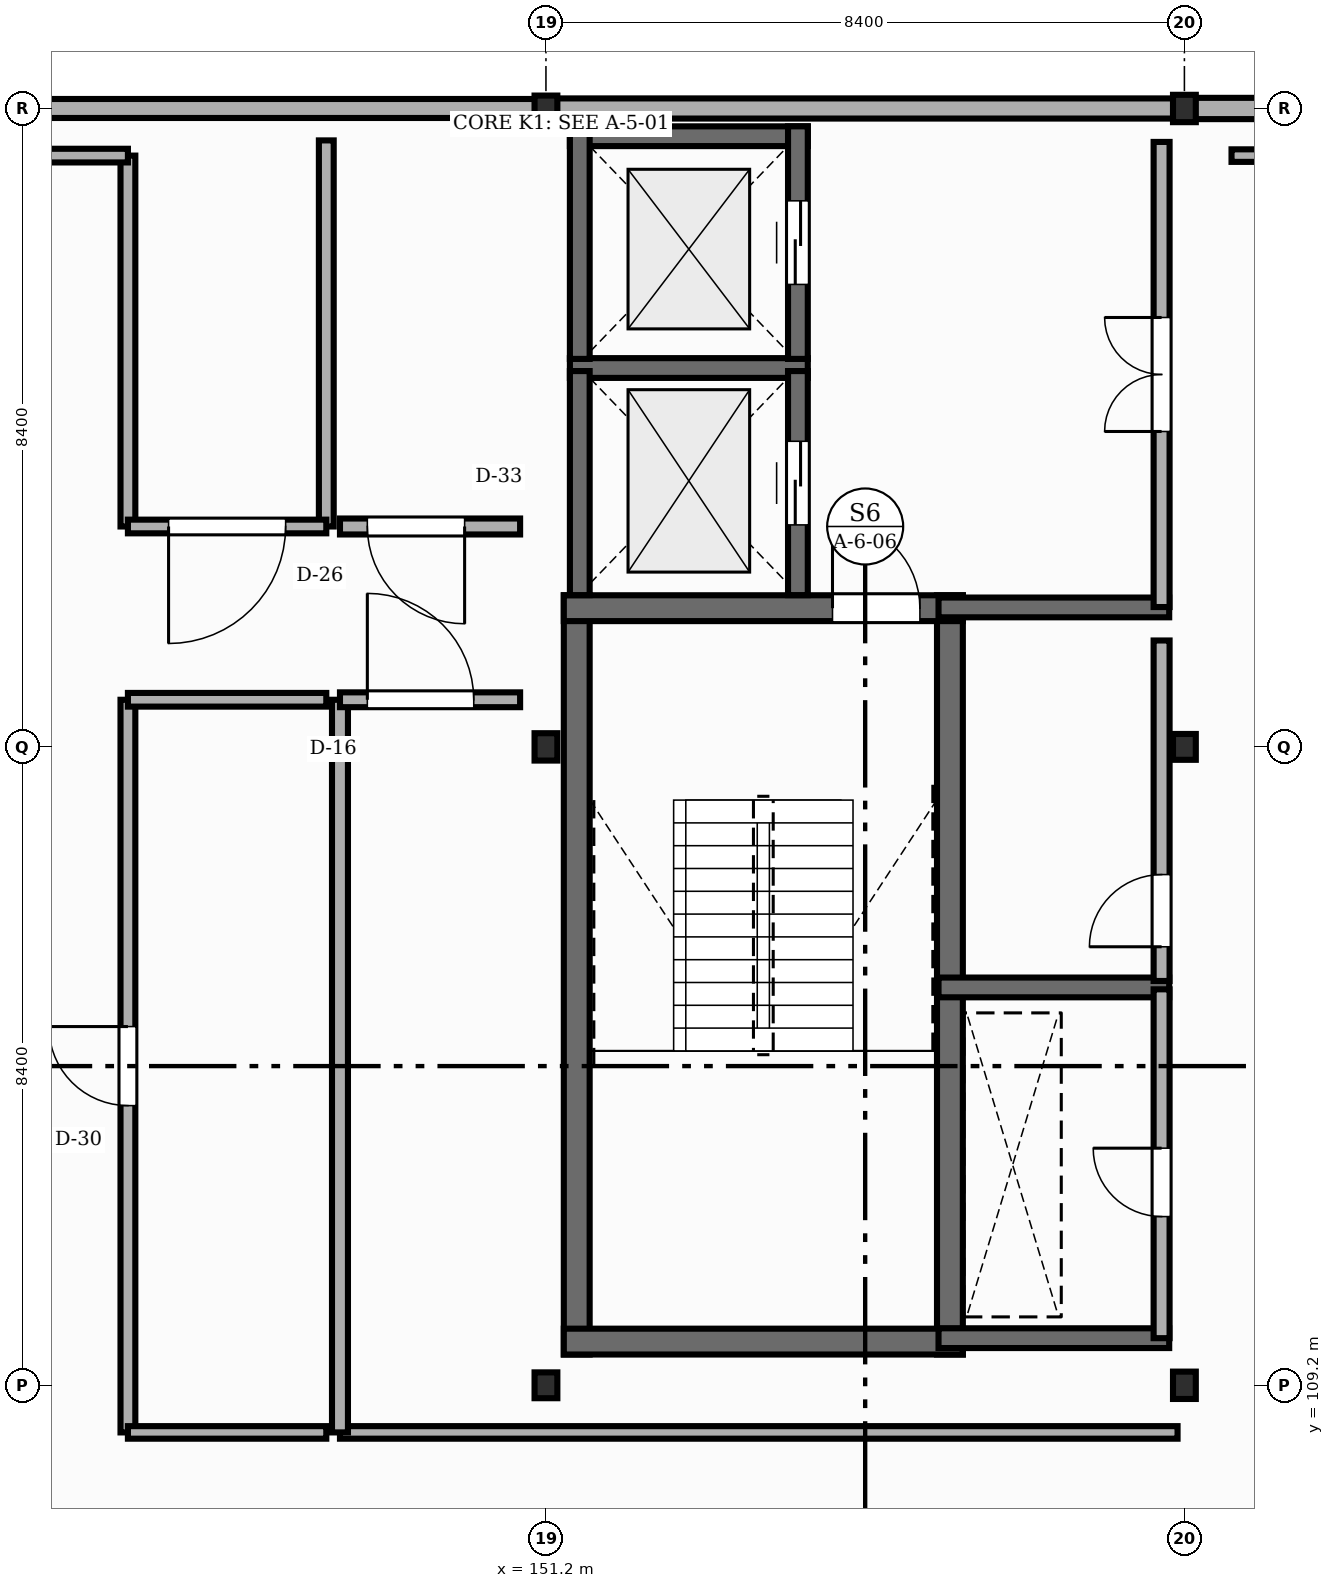
"""IFC4 building model, lengths in metres.
Left out: names, types, materials, properties, quantities, classifications, styles, units other than length and angle.
Written with IfcOpenShell. Run it as: python <this file> out.ifc"""

import sys

from ifc_helpers import new_model, si_unit, direction, frame, frame_2d, origin, origin_2d, place, context, subcontext, project, spatial, rectangle, i_section, extrude, element, fill, save


model = new_model("IFC4")
c1 = context("Model", 3, precision=1e-05, world=origin(), true_north=direction((0.0, 1.0)))
c2 = subcontext(c1, "Body", "Model", "MODEL_VIEW")
j1 = project(units=[si_unit("LENGTHUNIT", "METRE"), si_unit("PLANEANGLEUNIT", "RADIAN")], contexts=[c1])
p1 = place(None, origin())
s1 = spatial("IfcSite", under=j1, at=p1, CompositionType="ELEMENT")
p2 = place(p1, origin())
s2 = spatial("IfcBuilding", under=s1, at=p2, CompositionType="ELEMENT")
p3 = place(p2, frame((0.0, 0.0, 26.1)))
s3 = spatial("IfcBuildingStorey", under=s2, at=p3, CompositionType="ELEMENT", Elevation=26.1)
p4 = place(p3, frame((151.2, 109.2, 0.0), z_axis=(0.0, 0.0, 1.0), x_axis=(1.0, 0.0, 0.0)))
e1 = element("IfcColumn", 1, at=p4, inside=s3, PredefinedType="COLUMN", context=c2, shape_type="SweptSolid", body=[
    extrude(i_section(OverallWidth=0.3, OverallDepth=0.34, WebThickness=0.012, FlangeThickness=0.021, FilletRadius=0.027, at=origin_2d()), origin(), (0.0, 0.0, 1.0), 4.05),
])
p5 = place(p3, frame((151.2, 117.6, 0.0), z_axis=(0.0, 0.0, 1.0), x_axis=(1.0, 0.0, 0.0)))
e2 = element("IfcColumn", 2, at=p5, inside=s3, PredefinedType="COLUMN", context=c2, shape_type="SweptSolid", body=[
    extrude(i_section(OverallWidth=0.3, OverallDepth=0.36, WebThickness=0.012, FlangeThickness=0.022, FilletRadius=0.027, at=origin_2d()), origin(), (0.0, 0.0, 1.0), 4.05),
])
p6 = place(p3, frame((151.2, 126.0, 0.0), z_axis=(0.0, 0.0, 1.0), x_axis=(1.0, 0.0, 0.0)))
e3 = element("IfcColumn", 3, at=p6, inside=s3, PredefinedType="COLUMN", context=c2, shape_type="SweptSolid", body=[
    extrude(i_section(OverallWidth=0.3, OverallDepth=0.34, WebThickness=0.012, FlangeThickness=0.021, FilletRadius=0.027, at=origin_2d()), origin(), (0.0, 0.0, 1.0), 4.05),
])
p7 = place(p3, frame((159.6, 109.2, 0.0), z_axis=(0.0, 0.0, 1.0), x_axis=(1.0, 0.0, 0.0)))
e4 = element("IfcColumn", 4, at=p7, inside=s3, PredefinedType="COLUMN", context=c2, shape_type="SweptSolid", body=[
    extrude(i_section(OverallWidth=0.3, OverallDepth=0.36, WebThickness=0.012, FlangeThickness=0.022, FilletRadius=0.027, at=origin_2d()), origin(), (0.0, 0.0, 1.0), 4.05),
])
p8 = place(p3, frame((159.6, 117.6, 0.0), z_axis=(0.0, 0.0, 1.0), x_axis=(1.0, 0.0, 0.0)))
e5 = element("IfcColumn", 5, at=p8, inside=s3, PredefinedType="COLUMN", context=c2, shape_type="SweptSolid", body=[
    extrude(i_section(OverallWidth=0.3, OverallDepth=0.34, WebThickness=0.012, FlangeThickness=0.021, FilletRadius=0.027, at=origin_2d()), origin(), (0.0, 0.0, 1.0), 4.05),
])
p9 = place(p3, frame((159.6, 126.0, 0.0), z_axis=(0.0, 0.0, 1.0), x_axis=(1.0, 0.0, 0.0)))
e6 = element("IfcColumn", 6, at=p9, inside=s3, PredefinedType="COLUMN", context=c2, shape_type="SweptSolid", body=[
    extrude(i_section(OverallWidth=0.3, OverallDepth=0.36, WebThickness=0.012, FlangeThickness=0.022, FilletRadius=0.027, at=origin_2d()), origin(), (0.0, 0.0, 1.0), 4.05),
])
p10 = place(p3, frame((167.992, 126.0, 0.0), z_axis=(0.0, 0.0, 1.0), x_axis=(-1.0, 0.0, 0.0)))
e7 = element("IfcWall", 7, at=p10, inside=s3, PredefinedType="STANDARD", context=c2, shape_type="SweptSolid", body=[
    extrude(rectangle(XDim=8.384, YDim=0.28, at=frame_2d((4.192, 0.0))), origin(), (0.0, 0.0, 1.0), 3.497),
])
p11 = place(p3, frame((159.592, 126.0, 0.0), z_axis=(0.0, 0.0, 1.0), x_axis=(-1.0, 0.0, 0.0)))
e8 = element("IfcWall", 8, at=p11, inside=s3, PredefinedType="STANDARD", context=c2, shape_type="SweptSolid", body=[
    extrude(rectangle(XDim=8.384, YDim=0.265, at=frame_2d((4.192, 0.0))), origin(), (0.0, 0.0, 1.0), 3.527),
])
p12 = place(p3, frame((151.192, 126.0, 0.0), z_axis=(0.0, 0.0, 1.0), x_axis=(-1.0, 0.0, 0.0)))
e9 = element("IfcWall", 9, at=p12, inside=s3, PredefinedType="STANDARD", context=c2, shape_type="SweptSolid", body=[
    extrude(rectangle(XDim=8.384, YDim=0.25, at=frame_2d((4.192, 0.0))), origin(), (0.0, 0.0, 1.0), 3.497),
])
for number, where, z_axis, x_axis in (
    (10, (151.605, 109.605, 0.0), (0.0, 0.0, 1.0), (0.0, 1.0, 0.0)),
    (11, (156.515, 109.605, 0.0), (0.0, 0.0, 1.0), (0.0, 1.0, 0.0)),
):
    element("IfcWall", number, at=place(p3, frame(where, z_axis=z_axis, x_axis=x_axis)), inside=s3, PredefinedType="SHEAR", context=c2, shape_type="SweptSolid", body=[
        extrude(rectangle(XDim=9.99, YDim=0.34, at=frame_2d((4.995, 0.0))), origin(), (0.0, 0.0, 1.0), 3.85),
    ])
p13 = place(p3, frame((151.435, 109.775, 0.0), z_axis=(0.0, 0.0, 1.0), x_axis=(1.0, 0.0, 0.0)))
e12 = element("IfcWall", 12, at=p13, inside=s3, PredefinedType="SHEAR", context=c2, shape_type="SweptSolid", body=[
    extrude(rectangle(XDim=5.25, YDim=0.34, at=frame_2d((2.625, 0.0))), origin(), (0.0, 0.0, 1.0), 3.85),
])
p14 = place(p3, frame((151.435, 119.425, 0.0), z_axis=(0.0, 0.0, 1.0), x_axis=(1.0, 0.0, 0.0)))
e13 = element("IfcWall", 13, at=p14, inside=s3, PredefinedType="SHEAR", context=c2, shape_type="SweptSolid", body=[
    extrude(rectangle(XDim=5.25, YDim=0.34, at=frame_2d((2.625, 0.0))), origin(), (0.0, 0.0, 1.0), 3.85),
])
p15 = place(p14, frame((3.535, 0.0, 0.0)))
e14 = element("IfcOpeningElement", 14, at=p15, cuts=e13, PredefinedType="OPENING", context=c2, shape_type="SweptSolid", body=[
    extrude(rectangle(XDim=1.15, YDim=2.15, at=frame_2d((0.575, 1.075))), frame((0.0, 0.18, 0.0), z_axis=(0.0, -1.0, 0.0), x_axis=(1.0, 0.0, 0.0)), (0.0, 0.0, 1.0), 0.36),
])
p16 = place(p3, frame((151.515, 122.585, 0.0), z_axis=(0.0, 0.0, 1.0), x_axis=(1.0, 0.0, 0.0)))
e15 = element("IfcWall", 15, at=p16, inside=s3, PredefinedType="SHEAR", context=c2, shape_type="SweptSolid", body=[
    extrude(rectangle(XDim=3.13, YDim=0.26, at=frame_2d((1.565, 0.0))), origin(), (0.0, 0.0, 1.0), 3.85),
])
p17 = place(p3, frame((151.645, 119.597, 0.0), z_axis=(0.0, 0.0, 1.0), x_axis=(0.0, 1.0, 0.0)))
e16 = element("IfcWall", 16, at=p17, inside=s3, PredefinedType="SHEAR", context=c2, shape_type="SweptSolid", body=[
    extrude(rectangle(XDim=2.948, YDim=0.26, at=frame_2d((1.474, 0.0))), origin(), (0.0, 0.0, 1.0), 3.85),
])
p18 = place(p3, frame((154.515, 119.597, 0.0), z_axis=(0.0, 0.0, 1.0), x_axis=(0.0, 1.0, 0.0)))
e17 = element("IfcWall", 17, at=p18, inside=s3, PredefinedType="SHEAR", context=c2, shape_type="SweptSolid", body=[
    extrude(rectangle(XDim=2.948, YDim=0.26, at=frame_2d((1.474, 0.0))), origin(), (0.0, 0.0, 1.0), 3.85),
])
p19 = place(p18, frame((0.924, 0.0, 0.0)))
e18 = element("IfcOpeningElement", 18, at=p19, cuts=e17, PredefinedType="OPENING", context=c2, shape_type="SweptSolid", body=[
    extrude(rectangle(XDim=1.1, YDim=2.15, at=frame_2d((0.55, 1.075))), frame((0.0, 0.14, 0.0), z_axis=(0.0, -1.0, 0.0), x_axis=(1.0, 0.0, 0.0)), (0.0, 0.0, 1.0), 0.28),
])
p20 = place(p3, frame((151.515, 125.635, 0.0), z_axis=(0.0, 0.0, 1.0), x_axis=(1.0, 0.0, 0.0)))
e19 = element("IfcWall", 19, at=p20, inside=s3, PredefinedType="SHEAR", context=c2, shape_type="SweptSolid", body=[
    extrude(rectangle(XDim=3.13, YDim=0.26, at=frame_2d((1.565, 0.0))), origin(), (0.0, 0.0, 1.0), 3.85),
])
p21 = place(p3, frame((151.645, 122.705, 0.0), z_axis=(0.0, 0.0, 1.0), x_axis=(0.0, 1.0, 0.0)))
e20 = element("IfcWall", 20, at=p21, inside=s3, PredefinedType="SHEAR", context=c2, shape_type="SweptSolid", body=[
    extrude(rectangle(XDim=3.06, YDim=0.26, at=frame_2d((1.53, 0.0))), origin(), (0.0, 0.0, 1.0), 3.85),
])
p22 = place(p3, frame((154.515, 122.705, 0.0), z_axis=(0.0, 0.0, 1.0), x_axis=(0.0, 1.0, 0.0)))
e21 = element("IfcWall", 21, at=p22, inside=s3, PredefinedType="SHEAR", context=c2, shape_type="SweptSolid", body=[
    extrude(rectangle(XDim=3.06, YDim=0.26, at=frame_2d((1.53, 0.0))), origin(), (0.0, 0.0, 1.0), 3.85),
])
p23 = place(p22, frame((0.98, 0.0, 0.0)))
e22 = element("IfcOpeningElement", 22, at=p23, cuts=e21, PredefinedType="OPENING", context=c2, shape_type="SweptSolid", body=[
    extrude(rectangle(XDim=1.1, YDim=2.15, at=frame_2d((0.55, 1.075))), frame((0.0, 0.14, 0.0), z_axis=(0.0, -1.0, 0.0), x_axis=(1.0, 0.0, 0.0)), (0.0, 0.0, 1.0), 0.28),
])
for number, where, z_axis, x_axis in (
    (23, (156.365, 109.82, 0.0), (0.0, 0.0, 1.0), (1.0, 0.0, 0.0)),
    (24, (156.365, 114.435, 0.0), (0.0, 0.0, 1.0), (1.0, 0.0, 0.0)),
    (25, (156.365, 119.435, 0.0), (0.0, 0.0, 1.0), (1.0, 0.0, 0.0)),
):
    element("IfcWall", number, at=place(p3, frame(where, z_axis=z_axis, x_axis=x_axis)), inside=s3, PredefinedType="SHEAR", context=c2, shape_type="SweptSolid", body=[
        extrude(rectangle(XDim=3.035, YDim=0.26, at=frame_2d((1.518, 0.0))), origin(), (0.0, 0.0, 1.0), 3.85),
    ])
p24 = place(p3, frame((159.3, 109.82, 0.0), z_axis=(0.0, 0.0, 1.0), x_axis=(0.0, 1.0, 0.0)))
e26 = element("IfcWall", 26, at=p24, inside=s3, PredefinedType="STANDARD", context=c2, shape_type="SweptSolid", body=[
    extrude(rectangle(XDim=4.59, YDim=0.21, at=frame_2d((2.295, 0.0))), origin(), (0.0, 0.0, 1.0), 3.257),
])
p25 = place(p24, frame((1.6, 0.0, 0.0)))
e27 = element("IfcOpeningElement", 27, at=p25, cuts=e26, PredefinedType="OPENING", context=c2, shape_type="SweptSolid", body=[
    extrude(rectangle(XDim=0.9, YDim=2.1, at=frame_2d((0.45, 1.05))), frame((0.0, 0.115, 0.0), z_axis=(0.0, -1.0, 0.0), x_axis=(1.0, 0.0, 0.0)), (0.0, 0.0, 1.0), 0.23),
])
p26 = place(p3, frame((159.3, 114.52, 0.0), z_axis=(0.0, 0.0, 1.0), x_axis=(0.0, 1.0, 0.0)))
e28 = element("IfcWall", 28, at=p26, inside=s3, PredefinedType="STANDARD", context=c2, shape_type="SweptSolid", body=[
    extrude(rectangle(XDim=4.48, YDim=0.21, at=frame_2d((2.24, 0.0))), origin(), (0.0, 0.0, 1.0), 3.257),
])
p27 = place(p26, frame((0.45, 0.0, 0.0)))
e29 = element("IfcOpeningElement", 29, at=p27, cuts=e28, PredefinedType="OPENING", context=c2, shape_type="SweptSolid", body=[
    extrude(rectangle(XDim=0.95, YDim=2.15, at=frame_2d((0.475, 1.075))), frame((0.0, 0.115, 0.0), z_axis=(0.0, -1.0, 0.0), x_axis=(1.0, 0.0, 0.0)), (0.0, 0.0, 1.0), 0.23),
])
p28 = place(p3, frame((159.3, 119.44, 0.0), z_axis=(0.0, 0.0, 1.0), x_axis=(0.0, 1.0, 0.0)))
e30 = element("IfcWall", 30, at=p28, inside=s3, PredefinedType="STANDARD", context=c2, shape_type="SweptSolid", body=[
    extrude(rectangle(XDim=6.12, YDim=0.21, at=frame_2d((3.06, 0.0))), origin(), (0.0, 0.0, 1.0), 3.367),
])
p29 = place(p28, frame((2.31, 0.0, 0.0)))
e31 = element("IfcOpeningElement", 31, at=p29, cuts=e30, PredefinedType="OPENING", context=c2, shape_type="SweptSolid", body=[
    extrude(rectangle(XDim=1.5, YDim=2.2, at=frame_2d((0.75, 1.1))), frame((0.0, 0.115, 0.0), z_axis=(0.0, -1.0, 0.0), x_axis=(1.0, 0.0, 0.0)), (0.0, 0.0, 1.0), 0.23),
])
p30 = place(p3, frame((145.7, 120.5, -0.004), z_axis=(0.0, 0.0, 1.0), x_axis=(0.0, 1.0, 0.0)))
e32 = element("IfcWall", 32, at=p30, inside=s3, PredefinedType="STANDARD", context=c2, shape_type="SweptSolid", body=[
    extrude(rectangle(XDim=4.88, YDim=0.195, at=frame_2d((2.44, 0.0))), origin(), (0.0, 0.0, 1.0), 3.641),
])
p31 = place(p3, frame((145.7, 125.38, -0.004), z_axis=(0.0, 0.0, 1.0), x_axis=(-1.0, 0.0, 0.0)))
e33 = element("IfcWall", 33, at=p31, inside=s3, PredefinedType="STANDARD", context=c2, shape_type="SweptSolid", body=[
    extrude(rectangle(XDim=2.28, YDim=0.18, at=frame_2d((1.14, 0.0))), origin(), (0.0, 0.0, 1.0), 3.854),
])
p32 = place(p3, frame((148.31, 125.58, -0.004), z_axis=(0.0, 0.0, 1.0), x_axis=(0.0, -1.0, 0.0)))
e34 = element("IfcWall", 34, at=p32, inside=s3, PredefinedType="STANDARD", context=c2, shape_type="SweptSolid", body=[
    extrude(rectangle(XDim=5.08, YDim=0.195, at=frame_2d((2.54, 0.0))), origin(), (0.0, 0.0, 1.0), 3.641),
])
p33 = place(p3, frame((148.31, 120.5, -0.004), z_axis=(0.0, 0.0, 1.0), x_axis=(-1.0, 0.0, 0.0)))
e35 = element("IfcWall", 35, at=p33, inside=s3, PredefinedType="STANDARD", context=c2, shape_type="SweptSolid", body=[
    extrude(rectangle(XDim=2.61, YDim=0.18, at=frame_2d((1.305, 0.0))), origin(), (0.0, 0.0, 1.0), 3.854),
])
p34 = place(p33, frame((0.535, 0.0, 0.0)))
e36 = element("IfcOpeningElement", 36, at=p34, cuts=e35, PredefinedType="OPENING", context=c2, shape_type="SweptSolid", body=[
    extrude(rectangle(XDim=1.54, YDim=2.22, at=frame_2d((0.77, 1.11))), frame((0.0, 0.1, 0.0), z_axis=(0.0, -1.0, 0.0), x_axis=(1.0, 0.0, 0.0)), (0.0, 0.0, 1.0), 0.2),
])
p35 = place(p3, frame((159.51, 108.58, -0.004), z_axis=(0.0, 0.0, 1.0), x_axis=(-1.0, 0.0, 0.0)))
e37 = element("IfcWall", 37, at=p35, inside=s3, PredefinedType="STANDARD", context=c2, shape_type="SweptSolid", body=[
    extrude(rectangle(XDim=11.02, YDim=0.165, at=frame_2d((5.51, 0.0))), origin(), (0.0, 0.0, 1.0), 3.854),
])
p36 = place(p3, frame((148.49, 108.58, -0.004), z_axis=(0.0, 0.0, 1.0), x_axis=(0.0, 1.0, 0.0)))
e38 = element("IfcWall", 38, at=p36, inside=s3, PredefinedType="STANDARD", context=c2, shape_type="SweptSolid", body=[
    extrude(rectangle(XDim=9.64, YDim=0.21, at=frame_2d((4.82, 0.0))), origin(), (0.0, 0.0, 1.0), 3.591),
])
p37 = place(p3, frame((148.49, 118.22, -0.004), z_axis=(0.0, 0.0, 1.0), x_axis=(1.0, 0.0, 0.0)))
e39 = element("IfcWall", 39, at=p37, inside=s3, PredefinedType="STANDARD", context=c2, shape_type="SweptSolid", body=[
    extrude(rectangle(XDim=2.37, YDim=0.195, at=frame_2d((1.185, 0.0))), origin(), (0.0, 0.0, 1.0), 3.854),
])
p38 = place(p37, frame((0.36, 0.0, 0.0)))
e40 = element("IfcOpeningElement", 40, at=p38, cuts=e39, PredefinedType="OPENING", context=c2, shape_type="SweptSolid", body=[
    extrude(rectangle(XDim=1.4, YDim=2.14, at=frame_2d((0.7, 1.07))), frame((0.0, 0.107, 0.0), z_axis=(0.0, -1.0, 0.0), x_axis=(1.0, 0.0, 0.0)), (0.0, 0.0, 1.0), 0.215),
])
p39 = place(p3, frame((145.7, 108.58, -0.004), z_axis=(0.0, 0.0, 1.0), x_axis=(0.0, 1.0, 0.0)))
e41 = element("IfcWall", 41, at=p39, inside=s3, PredefinedType="STANDARD", context=c2, shape_type="SweptSolid", body=[
    extrude(rectangle(XDim=9.64, YDim=0.195, at=frame_2d((4.82, 0.0))), origin(), (0.0, 0.0, 1.0), 3.591),
])
p40 = place(p39, frame((4.3, 0.0, 0.0)))
e42 = element("IfcOpeningElement", 42, at=p40, cuts=e41, PredefinedType="OPENING", context=c2, shape_type="SweptSolid", body=[
    extrude(rectangle(XDim=1.04, YDim=2.3, at=frame_2d((0.52, 1.15))), frame((0.0, 0.107, 0.0), z_axis=(0.0, -1.0, 0.0), x_axis=(1.0, 0.0, 0.0)), (0.0, 0.0, 1.0), 0.215),
])
p41 = place(p3, frame((145.7, 118.22, -0.004), z_axis=(0.0, 0.0, 1.0), x_axis=(1.0, 0.0, 0.0)))
e43 = element("IfcWall", 43, at=p41, inside=s3, PredefinedType="STANDARD", context=c2, shape_type="SweptSolid", body=[
    extrude(rectangle(XDim=2.61, YDim=0.18, at=frame_2d((1.305, 0.0))), origin(), (0.0, 0.0, 1.0), 3.854),
])
p42 = place(p3, frame((148.31, 108.58, -0.004), z_axis=(0.0, 0.0, 1.0), x_axis=(-1.0, 0.0, 0.0)))
e44 = element("IfcWall", 44, at=p42, inside=s3, PredefinedType="STANDARD", context=c2, shape_type="SweptSolid", body=[
    extrude(rectangle(XDim=2.61, YDim=0.165, at=frame_2d((1.305, 0.0))), origin(), (0.0, 0.0, 1.0), 3.854),
])
p43 = place(p3, frame((162.5, 125.38, -0.004), z_axis=(0.0, 0.0, 1.0), x_axis=(-1.0, 0.0, 0.0)))
e45 = element("IfcWall", 45, at=p43, inside=s3, PredefinedType="STANDARD", context=c2, shape_type="SweptSolid", body=[
    extrude(rectangle(XDim=2.28, YDim=0.165, at=frame_2d((1.14, 0.0))), origin(), (0.0, 0.0, 1.0), 3.854),
])
p44 = place(p3, frame((150.86, 120.5, -0.004), z_axis=(0.0, 0.0, 1.0), x_axis=(-1.0, 0.0, 0.0)))
e46 = element("IfcWall", 46, at=p44, inside=s3, PredefinedType="STANDARD", context=c2, shape_type="SweptSolid", body=[
    extrude(rectangle(XDim=2.37, YDim=0.21, at=frame_2d((1.185, 0.0))), origin(), (0.0, 0.0, 1.0), 3.854),
])
p45 = place(p44, frame((0.73, 0.0, 0.0)))
e47 = element("IfcOpeningElement", 47, at=p45, cuts=e46, PredefinedType="OPENING", context=c2, shape_type="SweptSolid", body=[
    extrude(rectangle(XDim=1.28, YDim=2.3, at=frame_2d((0.64, 1.15))), frame((0.0, 0.115, 0.0), z_axis=(0.0, -1.0, 0.0), x_axis=(1.0, 0.0, 0.0)), (0.0, 0.0, 1.0), 0.23),
])
p46 = place(p15, origin())
e48 = element("IfcDoor", 48, at=p46, inside=s3, OperationType="SINGLE_SWING_LEFT", PredefinedType="DOOR", context=c2, shape_type="SweptSolid", body=[
    extrude(rectangle(XDim=1.15, YDim=2.15, at=frame_2d((0.575, 1.075))), frame((0.0, 0.025, 0.0), z_axis=(0.0, -1.0, 0.0), x_axis=(1.0, 0.0, 0.0)), (0.0, 0.0, 1.0), 0.05),
])
fill(e14, e48)
p47 = place(p19, origin())
e49 = element("IfcDoor", 49, at=p47, inside=s3, OperationType="DOUBLE_DOOR_SLIDING", PredefinedType="DOOR", context=c2, shape_type="SweptSolid", body=[
    extrude(rectangle(XDim=1.1, YDim=2.15, at=frame_2d((0.55, 1.075))), frame((0.0, 0.025, 0.0), z_axis=(0.0, -1.0, 0.0), x_axis=(1.0, 0.0, 0.0)), (0.0, 0.0, 1.0), 0.05),
])
fill(e18, e49)
p48 = place(p23, origin())
e50 = element("IfcDoor", 50, at=p48, inside=s3, OperationType="DOUBLE_DOOR_SLIDING", PredefinedType="DOOR", context=c2, shape_type="SweptSolid", body=[
    extrude(rectangle(XDim=1.1, YDim=2.15, at=frame_2d((0.55, 1.075))), frame((0.0, 0.025, 0.0), z_axis=(0.0, -1.0, 0.0), x_axis=(1.0, 0.0, 0.0)), (0.0, 0.0, 1.0), 0.05),
])
fill(e22, e50)
p49 = place(p25, origin())
e51 = element("IfcDoor", 51, at=p49, inside=s3, OperationType="SINGLE_SWING_RIGHT", PredefinedType="DOOR", context=c2, shape_type="SweptSolid", body=[
    extrude(rectangle(XDim=0.9, YDim=2.1, at=frame_2d((0.45, 1.05))), frame((0.0, 0.025, 0.0), z_axis=(0.0, -1.0, 0.0), x_axis=(1.0, 0.0, 0.0)), (0.0, 0.0, 1.0), 0.05),
])
fill(e27, e51)
p50 = place(p27, origin())
e52 = element("IfcDoor", 52, at=p50, inside=s3, OperationType="SINGLE_SWING_LEFT", PredefinedType="DOOR", context=c2, shape_type="SweptSolid", body=[
    extrude(rectangle(XDim=0.95, YDim=2.15, at=frame_2d((0.475, 1.075))), frame((0.0, 0.025, 0.0), z_axis=(0.0, -1.0, 0.0), x_axis=(1.0, 0.0, 0.0)), (0.0, 0.0, 1.0), 0.05),
])
fill(e29, e52)
p51 = place(p29, origin())
e53 = element("IfcDoor", 53, at=p51, inside=s3, OperationType="DOUBLE_DOOR_SINGLE_SWING", PredefinedType="DOOR", context=c2, shape_type="SweptSolid", body=[
    extrude(rectangle(XDim=1.5, YDim=2.2, at=frame_2d((0.75, 1.1))), frame((0.0, 0.025, 0.0), z_axis=(0.0, -1.0, 0.0), x_axis=(1.0, 0.0, 0.0)), (0.0, 0.0, 1.0), 0.05),
])
fill(e31, e53)
p52 = place(p34, origin())
e54 = element("IfcDoor", 54, at=p52, inside=s3, OperationType="SINGLE_SWING_RIGHT", PredefinedType="DOOR", context=c2, shape_type="SweptSolid", body=[
    extrude(rectangle(XDim=1.54, YDim=2.22, at=frame_2d((0.77, 1.11))), frame((0.0, 0.025, 0.0), z_axis=(0.0, -1.0, 0.0), x_axis=(1.0, 0.0, 0.0)), (0.0, 0.0, 1.0), 0.05),
])
fill(e36, e54)
p53 = place(p38, origin())
e55 = element("IfcDoor", 55, at=p53, inside=s3, OperationType="SINGLE_SWING_LEFT", PredefinedType="DOOR", context=c2, shape_type="SweptSolid", body=[
    extrude(rectangle(XDim=1.4, YDim=2.14, at=frame_2d((0.7, 1.07))), frame((0.0, 0.025, 0.0), z_axis=(0.0, -1.0, 0.0), x_axis=(1.0, 0.0, 0.0)), (0.0, 0.0, 1.0), 0.05),
])
fill(e40, e55)
p54 = place(p40, origin())
e56 = element("IfcDoor", 56, at=p54, inside=s3, OperationType="SINGLE_SWING_RIGHT", PredefinedType="DOOR", context=c2, shape_type="SweptSolid", body=[
    extrude(rectangle(XDim=1.04, YDim=2.3, at=frame_2d((0.52, 1.15))), frame((0.0, 0.025, 0.0), z_axis=(0.0, -1.0, 0.0), x_axis=(1.0, 0.0, 0.0)), (0.0, 0.0, 1.0), 0.05),
])
fill(e42, e56)
p55 = place(p45, origin())
e57 = element("IfcDoor", 57, at=p55, inside=s3, OperationType="SINGLE_SWING_LEFT", PredefinedType="DOOR", context=c2, shape_type="SweptSolid", body=[
    extrude(rectangle(XDim=1.28, YDim=2.3, at=frame_2d((0.64, 1.15))), frame((0.0, 0.025, 0.0), z_axis=(0.0, -1.0, 0.0), x_axis=(1.0, 0.0, 0.0)), (0.0, 0.0, 1.0), 0.05),
])
fill(e47, e57)
save(model, sys.argv[1])
